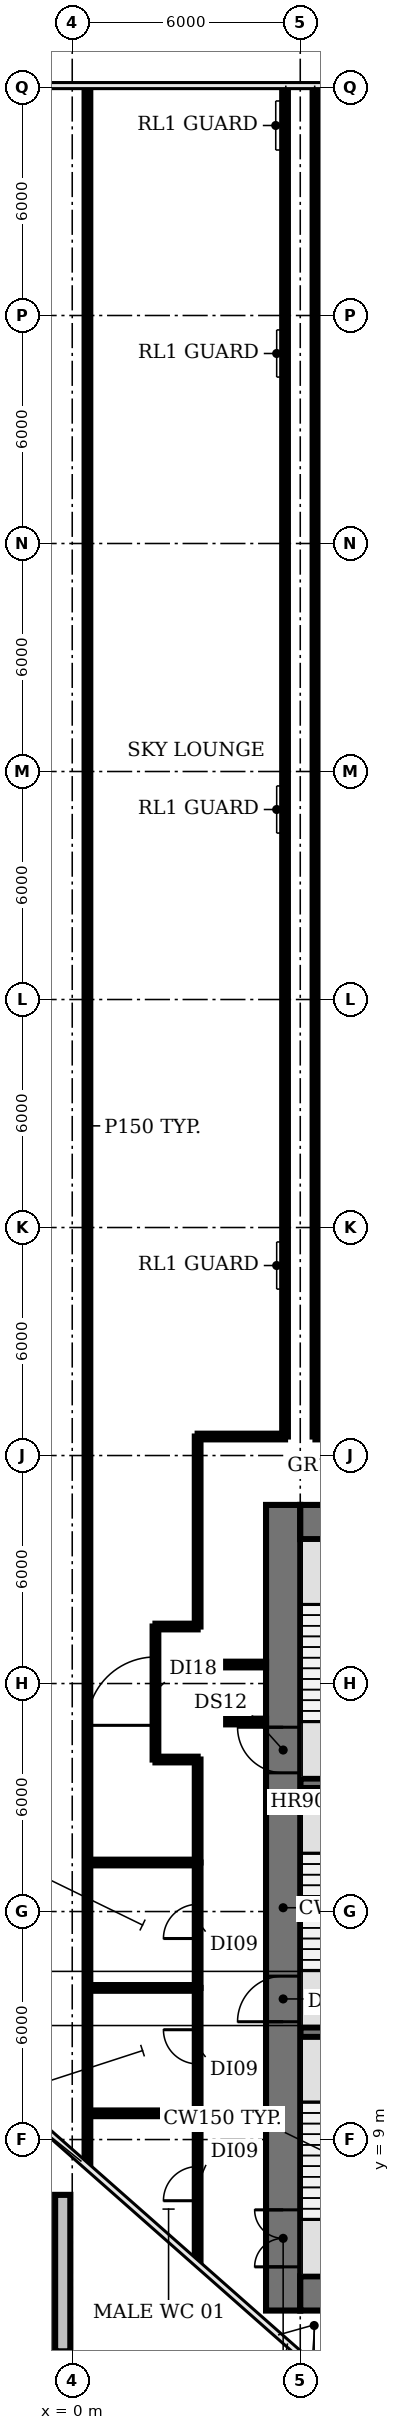
"""IFC4 building model, lengths in metres.
Left out: names, types, materials, properties, quantities, classifications, styles, units other than length and angle.
Written with IfcOpenShell. Run it as: python <this file> out.ifc"""

import sys

from ifc_helpers import new_model, si_unit, direction, frame, frame_2d, origin, place, context, subcontext, project, spatial, rectangle, extrude, element, fill, save


model = new_model("IFC4")
c1 = context("Model", 3, precision=1e-05, world=origin(), true_north=direction((0.0, 1.0)))
c2 = subcontext(c1, "Body", "Model", "MODEL_VIEW")
j1 = project(units=[si_unit("LENGTHUNIT", "METRE"), si_unit("PLANEANGLEUNIT", "RADIAN")], contexts=[c1])
p1 = place(None, origin())
s1 = spatial("IfcSite", under=j1, at=p1, CompositionType="ELEMENT")
p2 = place(p1, origin())
s2 = spatial("IfcBuilding", under=s1, at=p2, CompositionType="ELEMENT")
p3 = place(p2, frame((0.0, 0.0, 79.4)))
s3 = spatial("IfcBuildingStorey", under=s2, at=p3, CompositionType="ELEMENT", Elevation=79.4)
p4 = place(p3, frame((-0.25, 3.427, 0.0), z_axis=(0.0, 0.0, 1.0), x_axis=(0.0, 1.0, 0.0)))
e1 = element("IfcWall", 1, at=p4, inside=s3, PredefinedType="SOLIDWALL", context=c2, shape_type="SweptSolid", body=[
    extrude(rectangle(XDim=4.117, YDim=0.4, at=frame_2d((2.059, 0.0))), origin(), (0.0, 0.0, 1.0), 0.6),
])
for number, where, z_axis, x_axis in (
    (2, (6.0, 11.825, 0.0), (0.0, 0.0, 1.0), (1.0, 0.0, 0.0)),
    (3, (6.0, 18.375, 0.0), (0.0, 0.0, 1.0), (1.0, 0.0, 0.0)),
):
    element("IfcWall", number, at=place(p3, frame(where, z_axis=z_axis, x_axis=x_axis)), inside=s3, PredefinedType="SHEAR", context=c2, shape_type="SweptSolid", body=[
        extrude(rectangle(XDim=3.15, YDim=0.25, at=frame_2d((1.575, 0.0))), origin(), (0.0, 0.0, 1.0), 8.05),
    ])
p5 = place(p3, frame((5.55, 4.5, 0.0), z_axis=(0.0, 0.0, 1.0), x_axis=(0.0, 1.0, 0.0)))
e4 = element("IfcWall", 4, at=p5, inside=s3, PredefinedType="SHEAR", context=c2, shape_type="SweptSolid", body=[
    extrude(rectangle(XDim=21.2, YDim=0.9, at=frame_2d((10.6, 0.0))), origin(), (0.0, 0.0, 1.0), 8.05),
])
p6 = place(p5, frame((1.15, 0.0, 0.0)))
e5 = element("IfcOpeningElement", 5, at=p6, cuts=e4, PredefinedType="OPENING", context=c2, shape_type="SweptSolid", body=[
    extrude(rectangle(XDim=1.5, YDim=2.1, at=frame_2d((0.75, 1.05))), frame((0.0, 0.46, 0.0), z_axis=(0.0, -1.0, 0.0), x_axis=(1.0, 0.0, 0.0)), (0.0, 0.0, 1.0), 0.92),
])
p7 = place(p5, frame((7.6, 0.0, 0.0)))
e6 = element("IfcOpeningElement", 6, at=p7, cuts=e4, PredefinedType="OPENING", context=c2, shape_type="SweptSolid", body=[
    extrude(rectangle(XDim=1.2, YDim=2.1, at=frame_2d((0.6, 1.05))), frame((0.0, 0.46, 0.0), z_axis=(0.0, -1.0, 0.0), x_axis=(1.0, 0.0, 0.0)), (0.0, 0.0, 1.0), 0.92),
])
p8 = place(p5, frame((14.15, 0.0, 0.0)))
e7 = element("IfcOpeningElement", 7, at=p8, cuts=e4, PredefinedType="OPENING", context=c2, shape_type="SweptSolid", body=[
    extrude(rectangle(XDim=1.2, YDim=2.1, at=frame_2d((0.6, 1.05))), frame((0.0, 0.46, 0.0), z_axis=(0.0, -1.0, 0.0), x_axis=(1.0, 0.0, 0.0)), (0.0, 0.0, 1.0), 0.92),
])
p9 = place(p3, frame((24.0, 4.95, 0.0), z_axis=(0.0, 0.0, 1.0), x_axis=(-1.0, 0.0, 0.0)))
e8 = element("IfcWall", 8, at=p9, inside=s3, PredefinedType="SHEAR", context=c2, shape_type="SweptSolid", body=[
    extrude(rectangle(XDim=18.0, YDim=0.9, at=frame_2d((9.0, 0.0))), origin(), (0.0, 0.0, 1.0), 8.05),
])
p10 = place(p9, frame((13.0, 0.0, 0.0)))
e9 = element("IfcOpeningElement", 9, at=p10, cuts=e8, PredefinedType="OPENING", context=c2, shape_type="SweptSolid", body=[
    extrude(rectangle(XDim=1.2, YDim=2.1, at=frame_2d((0.6, 1.05))), frame((0.0, 0.46, 0.0), z_axis=(0.0, -1.0, 0.0), x_axis=(1.0, 0.0, 0.0)), (0.0, 0.0, 1.0), 0.92),
])
p11 = place(p9, frame((4.9, 0.0, 0.0)))
e10 = element("IfcOpeningElement", 10, at=p11, cuts=e8, PredefinedType="OPENING", context=c2, shape_type="SweptSolid", body=[
    extrude(rectangle(XDim=1.0, YDim=2.1, at=frame_2d((0.5, 1.05))), frame((0.0, 0.46, 0.0), z_axis=(0.0, -1.0, 0.0), x_axis=(1.0, 0.0, 0.0)), (0.0, 0.0, 1.0), 0.92),
])
p12 = place(p3, frame((6.0, 25.25, 0.0), z_axis=(0.0, 0.0, 1.0), x_axis=(1.0, 0.0, 0.0)))
e11 = element("IfcWall", 11, at=p12, inside=s3, PredefinedType="SHEAR", context=c2, shape_type="SweptSolid", body=[
    extrude(rectangle(XDim=18.0, YDim=0.9, at=frame_2d((9.0, 0.0))), origin(), (0.0, 0.0, 1.0), 8.05),
])
p13 = place(p3, frame((0.4, 8.35, 0.0), z_axis=(0.0, 0.0, 1.0), x_axis=(0.0, 1.0, 0.0)))
e12 = element("IfcWall", 12, at=p13, inside=s3, PredefinedType="PARTITIONING", context=c2, shape_type="SweptSolid", body=[
    extrude(rectangle(XDim=54.65, YDim=0.15, at=frame_2d((27.325, 0.0))), origin(), (0.0, 0.0, 1.0), 6.33),
])
for number, where, z_axis, x_axis in (
    (13, (0.4, 9.69, 0.0), (0.0, 0.0, 1.0), (1.0, 0.0, 0.0)),
    (14, (0.4, 12.99, 0.0), (0.0, 0.0, 1.0), (1.0, 0.0, 0.0)),
    (15, (0.4, 16.29, 0.0), (0.0, 0.0, 1.0), (1.0, 0.0, 0.0)),
):
    element("IfcWall", number, at=place(p3, frame(where, z_axis=z_axis, x_axis=x_axis)), inside=s3, PredefinedType="PARTITIONING", context=c2, shape_type="SweptSolid", body=[
        extrude(rectangle(XDim=2.9, YDim=0.15, at=frame_2d((1.45, 0.0))), origin(), (0.0, 0.0, 1.0), 6.33),
    ])
p14 = place(p3, frame((2.19, 19.0, 0.0), z_axis=(0.0, 0.0, 1.0), x_axis=(0.0, 1.0, 0.0)))
e16 = element("IfcWall", 16, at=p14, inside=s3, PredefinedType="PARTITIONING", context=c2, shape_type="SweptSolid", body=[
    extrude(rectangle(XDim=3.5, YDim=0.15, at=frame_2d((1.75, 0.0))), origin(), (0.0, 0.0, 1.0), 6.33),
])
p15 = place(p14, frame((0.9, 0.0, 0.0)))
e17 = element("IfcOpeningElement", 17, at=p15, cuts=e16, PredefinedType="OPENING", context=c2, shape_type="SweptSolid", body=[
    extrude(rectangle(XDim=1.8, YDim=2.1, at=frame_2d((0.9, 1.05))), frame((0.0, 0.085, 0.0), z_axis=(0.0, -1.0, 0.0), x_axis=(1.0, 0.0, 0.0)), (0.0, 0.0, 1.0), 0.17),
])
for number, where, z_axis, x_axis in (
    (18, (2.19, 19.0, 0.0), (0.0, 0.0, 1.0), (1.0, 0.0, 0.0)),
    (19, (2.19, 22.5, 0.0), (0.0, 0.0, 1.0), (1.0, 0.0, 0.0)),
):
    element("IfcWall", number, at=place(p3, frame(where, z_axis=z_axis, x_axis=x_axis)), inside=s3, PredefinedType="PARTITIONING", context=c2, shape_type="SweptSolid", body=[
        extrude(rectangle(XDim=1.11, YDim=0.15, at=frame_2d((0.555, 0.0))), origin(), (0.0, 0.0, 1.0), 6.33),
    ])
p16 = place(p3, frame((3.3, 5.79, 0.0), z_axis=(0.0, 0.0, 1.0), x_axis=(0.0, 1.0, 0.0)))
e20 = element("IfcWall", 20, at=p16, inside=s3, PredefinedType="PARTITIONING", context=c2, shape_type="SweptSolid", body=[
    extrude(rectangle(XDim=3.9, YDim=0.15, at=frame_2d((1.95, 0.0))), origin(), (0.0, 0.0, 1.0), 6.33),
])
p17 = place(p16, frame((1.6, 0.0, 0.0)))
e21 = element("IfcOpeningElement", 21, at=p17, cuts=e20, PredefinedType="OPENING", context=c2, shape_type="SweptSolid", body=[
    extrude(rectangle(XDim=0.9, YDim=2.1, at=frame_2d((0.45, 1.05))), frame((0.0, 0.085, 0.0), z_axis=(0.0, -1.0, 0.0), x_axis=(1.0, 0.0, 0.0)), (0.0, 0.0, 1.0), 0.17),
])
p18 = place(p3, frame((3.3, 9.69, 0.0), z_axis=(0.0, 0.0, 1.0), x_axis=(0.0, 1.0, 0.0)))
e22 = element("IfcWall", 22, at=p18, inside=s3, PredefinedType="PARTITIONING", context=c2, shape_type="SweptSolid", body=[
    extrude(rectangle(XDim=3.3, YDim=0.15, at=frame_2d((1.65, 0.0))), origin(), (0.0, 0.0, 1.0), 6.33),
])
p19 = place(p18, frame((1.3, 0.0, 0.0)))
e23 = element("IfcOpeningElement", 23, at=p19, cuts=e22, PredefinedType="OPENING", context=c2, shape_type="SweptSolid", body=[
    extrude(rectangle(XDim=0.9, YDim=2.1, at=frame_2d((0.45, 1.05))), frame((0.0, 0.085, 0.0), z_axis=(0.0, -1.0, 0.0), x_axis=(1.0, 0.0, 0.0)), (0.0, 0.0, 1.0), 0.17),
])
p20 = place(p3, frame((3.3, 12.99, 0.0), z_axis=(0.0, 0.0, 1.0), x_axis=(0.0, 1.0, 0.0)))
e24 = element("IfcWall", 24, at=p20, inside=s3, PredefinedType="PARTITIONING", context=c2, shape_type="SweptSolid", body=[
    extrude(rectangle(XDim=3.3, YDim=0.15, at=frame_2d((1.65, 0.0))), origin(), (0.0, 0.0, 1.0), 6.33),
])
p21 = place(p20, frame((1.3, 0.0, 0.0)))
e25 = element("IfcOpeningElement", 25, at=p21, cuts=e24, PredefinedType="OPENING", context=c2, shape_type="SweptSolid", body=[
    extrude(rectangle(XDim=0.9, YDim=2.1, at=frame_2d((0.45, 1.05))), frame((0.0, 0.085, 0.0), z_axis=(0.0, -1.0, 0.0), x_axis=(1.0, 0.0, 0.0)), (0.0, 0.0, 1.0), 0.17),
])
p22 = place(p3, frame((3.3, 16.29, 0.0), z_axis=(0.0, 0.0, 1.0), x_axis=(0.0, 1.0, 0.0)))
e26 = element("IfcWall", 26, at=p22, inside=s3, PredefinedType="PARTITIONING", context=c2, shape_type="SweptSolid", body=[
    extrude(rectangle(XDim=2.71, YDim=0.15, at=frame_2d((1.355, 0.0))), origin(), (0.0, 0.0, 1.0), 6.33),
])
p23 = place(p3, frame((3.3, 22.5, 0.0), z_axis=(0.0, 0.0, 1.0), x_axis=(0.0, 1.0, 0.0)))
e27 = element("IfcWall", 27, at=p23, inside=s3, PredefinedType="PARTITIONING", context=c2, shape_type="SweptSolid", body=[
    extrude(rectangle(XDim=5.0, YDim=0.15, at=frame_2d((2.5, 0.0))), origin(), (0.0, 0.0, 1.0), 6.33),
])
p24 = place(p3, frame((3.3, 27.5, 0.0), z_axis=(0.0, 0.0, 1.0), x_axis=(1.0, 0.0, 0.0)))
e28 = element("IfcWall", 28, at=p24, inside=s3, PredefinedType="PARTITIONING", context=c2, shape_type="SweptSolid", body=[
    extrude(rectangle(XDim=2.3, YDim=0.15, at=frame_2d((1.15, 0.0))), origin(), (0.0, 0.0, 1.0), 6.33),
])
for number, where, z_axis, x_axis in (
    (29, (4.05, 20.0, 0.0), (0.0, 0.0, 1.0), (1.0, 0.0, 0.0)),
    (30, (4.05, 21.5, 0.0), (0.0, 0.0, 1.0), (1.0, 0.0, 0.0)),
):
    element("IfcWall", number, at=place(p3, frame(where, z_axis=z_axis, x_axis=x_axis)), inside=s3, PredefinedType="PARTITIONING", context=c2, shape_type="SweptSolid", body=[
        extrude(rectangle(XDim=1.05, YDim=0.15, at=frame_2d((0.525, 0.0))), origin(), (0.0, 0.0, 1.0), 6.33),
    ])
p25 = place(p3, frame((5.6, 27.5, 0.0), z_axis=(0.0, 0.0, 1.0), x_axis=(0.0, 1.0, 0.0)))
e31 = element("IfcWall", 31, at=p25, inside=s3, PredefinedType="PARTITIONING", context=c2, shape_type="SweptSolid", body=[
    extrude(rectangle(XDim=35.465, YDim=0.15, at=frame_2d((17.732, 0.0))), origin(), (0.0, 0.0, 1.0), 6.33),
])
p26 = place(p3, frame((6.4, 27.5, 0.0), z_axis=(0.0, 0.0, 1.0), x_axis=(0.0, 1.0, 0.0)))
e32 = element("IfcWall", 32, at=p26, inside=s3, PredefinedType="PARTITIONING", context=c2, shape_type="SweptSolid", body=[
    extrude(rectangle(XDim=35.5, YDim=0.15, at=frame_2d((17.75, 0.0))), origin(), (0.0, 0.0, 1.0), 6.33),
])
p27 = place(p3, frame((6.4, 27.5, 0.0), z_axis=(0.0, 0.0, 1.0), x_axis=(1.0, 0.0, 0.0)))
e33 = element("IfcWall", 33, at=p27, inside=s3, PredefinedType="PARTITIONING", context=c2, shape_type="SweptSolid", body=[
    extrude(rectangle(XDim=11.2, YDim=0.15, at=frame_2d((5.6, 0.0))), origin(), (0.0, 0.0, 1.0), 6.33),
])
p28 = place(p27, frame((5.0, 0.0, 0.0)))
e34 = element("IfcOpeningElement", 34, at=p28, cuts=e33, PredefinedType="OPENING", context=c2, shape_type="SweptSolid", body=[
    extrude(rectangle(XDim=1.2, YDim=2.1, at=frame_2d((0.6, 1.05))), frame((0.0, 0.085, 0.0), z_axis=(0.0, -1.0, 0.0), x_axis=(1.0, 0.0, 0.0)), (0.0, 0.0, 1.0), 0.17),
])
p29 = place(p6, origin())
e35 = element("IfcDoor", 35, at=p29, inside=s3, OperationType="DOUBLE_DOOR_SINGLE_SWING", PredefinedType="DOOR", context=c2, shape_type="SweptSolid", body=[
    extrude(rectangle(XDim=1.5, YDim=2.1, at=frame_2d((0.75, 1.05))), frame((0.0, 0.025, 0.0), z_axis=(0.0, -1.0, 0.0), x_axis=(1.0, 0.0, 0.0)), (0.0, 0.0, 1.0), 0.05),
])
fill(e5, e35)
p30 = place(p7, origin())
e36 = element("IfcDoor", 36, at=p30, inside=s3, OperationType="SINGLE_SWING_LEFT", PredefinedType="DOOR", context=c2, shape_type="SweptSolid", body=[
    extrude(rectangle(XDim=1.2, YDim=2.1, at=frame_2d((0.6, 1.05))), frame((0.0, 0.025, 0.0), z_axis=(0.0, -1.0, 0.0), x_axis=(1.0, 0.0, 0.0)), (0.0, 0.0, 1.0), 0.05),
])
fill(e6, e36)
p31 = place(p8, origin())
e37 = element("IfcDoor", 37, at=p31, inside=s3, OperationType="SINGLE_SWING_RIGHT", PredefinedType="DOOR", context=c2, shape_type="SweptSolid", body=[
    extrude(rectangle(XDim=1.2, YDim=2.1, at=frame_2d((0.6, 1.05))), frame((0.0, 0.025, 0.0), z_axis=(0.0, -1.0, 0.0), x_axis=(1.0, 0.0, 0.0)), (0.0, 0.0, 1.0), 0.05),
])
fill(e7, e37)
p32 = place(p15, origin())
e38 = element("IfcDoor", 38, at=p32, inside=s3, OperationType="SINGLE_SWING_LEFT", PredefinedType="DOOR", context=c2, shape_type="SweptSolid", body=[
    extrude(rectangle(XDim=1.8, YDim=2.1, at=frame_2d((0.9, 1.05))), frame((0.0, 0.025, 0.0), z_axis=(0.0, -1.0, 0.0), x_axis=(1.0, 0.0, 0.0)), (0.0, 0.0, 1.0), 0.05),
])
fill(e17, e38)
p33 = place(p17, origin())
e39 = element("IfcDoor", 39, at=p33, inside=s3, OperationType="SINGLE_SWING_LEFT", PredefinedType="DOOR", context=c2, shape_type="SweptSolid", body=[
    extrude(rectangle(XDim=0.9, YDim=2.1, at=frame_2d((0.45, 1.05))), frame((0.0, 0.025, 0.0), z_axis=(0.0, -1.0, 0.0), x_axis=(1.0, 0.0, 0.0)), (0.0, 0.0, 1.0), 0.05),
])
fill(e21, e39)
p34 = place(p19, origin())
e40 = element("IfcDoor", 40, at=p34, inside=s3, OperationType="SINGLE_SWING_RIGHT", PredefinedType="DOOR", context=c2, shape_type="SweptSolid", body=[
    extrude(rectangle(XDim=0.9, YDim=2.1, at=frame_2d((0.45, 1.05))), frame((0.0, 0.025, 0.0), z_axis=(0.0, -1.0, 0.0), x_axis=(1.0, 0.0, 0.0)), (0.0, 0.0, 1.0), 0.05),
])
fill(e23, e40)
p35 = place(p21, origin())
e41 = element("IfcDoor", 41, at=p35, inside=s3, OperationType="SINGLE_SWING_LEFT", PredefinedType="DOOR", context=c2, shape_type="SweptSolid", body=[
    extrude(rectangle(XDim=0.9, YDim=2.1, at=frame_2d((0.45, 1.05))), frame((0.0, 0.025, 0.0), z_axis=(0.0, -1.0, 0.0), x_axis=(1.0, 0.0, 0.0)), (0.0, 0.0, 1.0), 0.05),
])
fill(e25, e41)
save(model, sys.argv[1])
